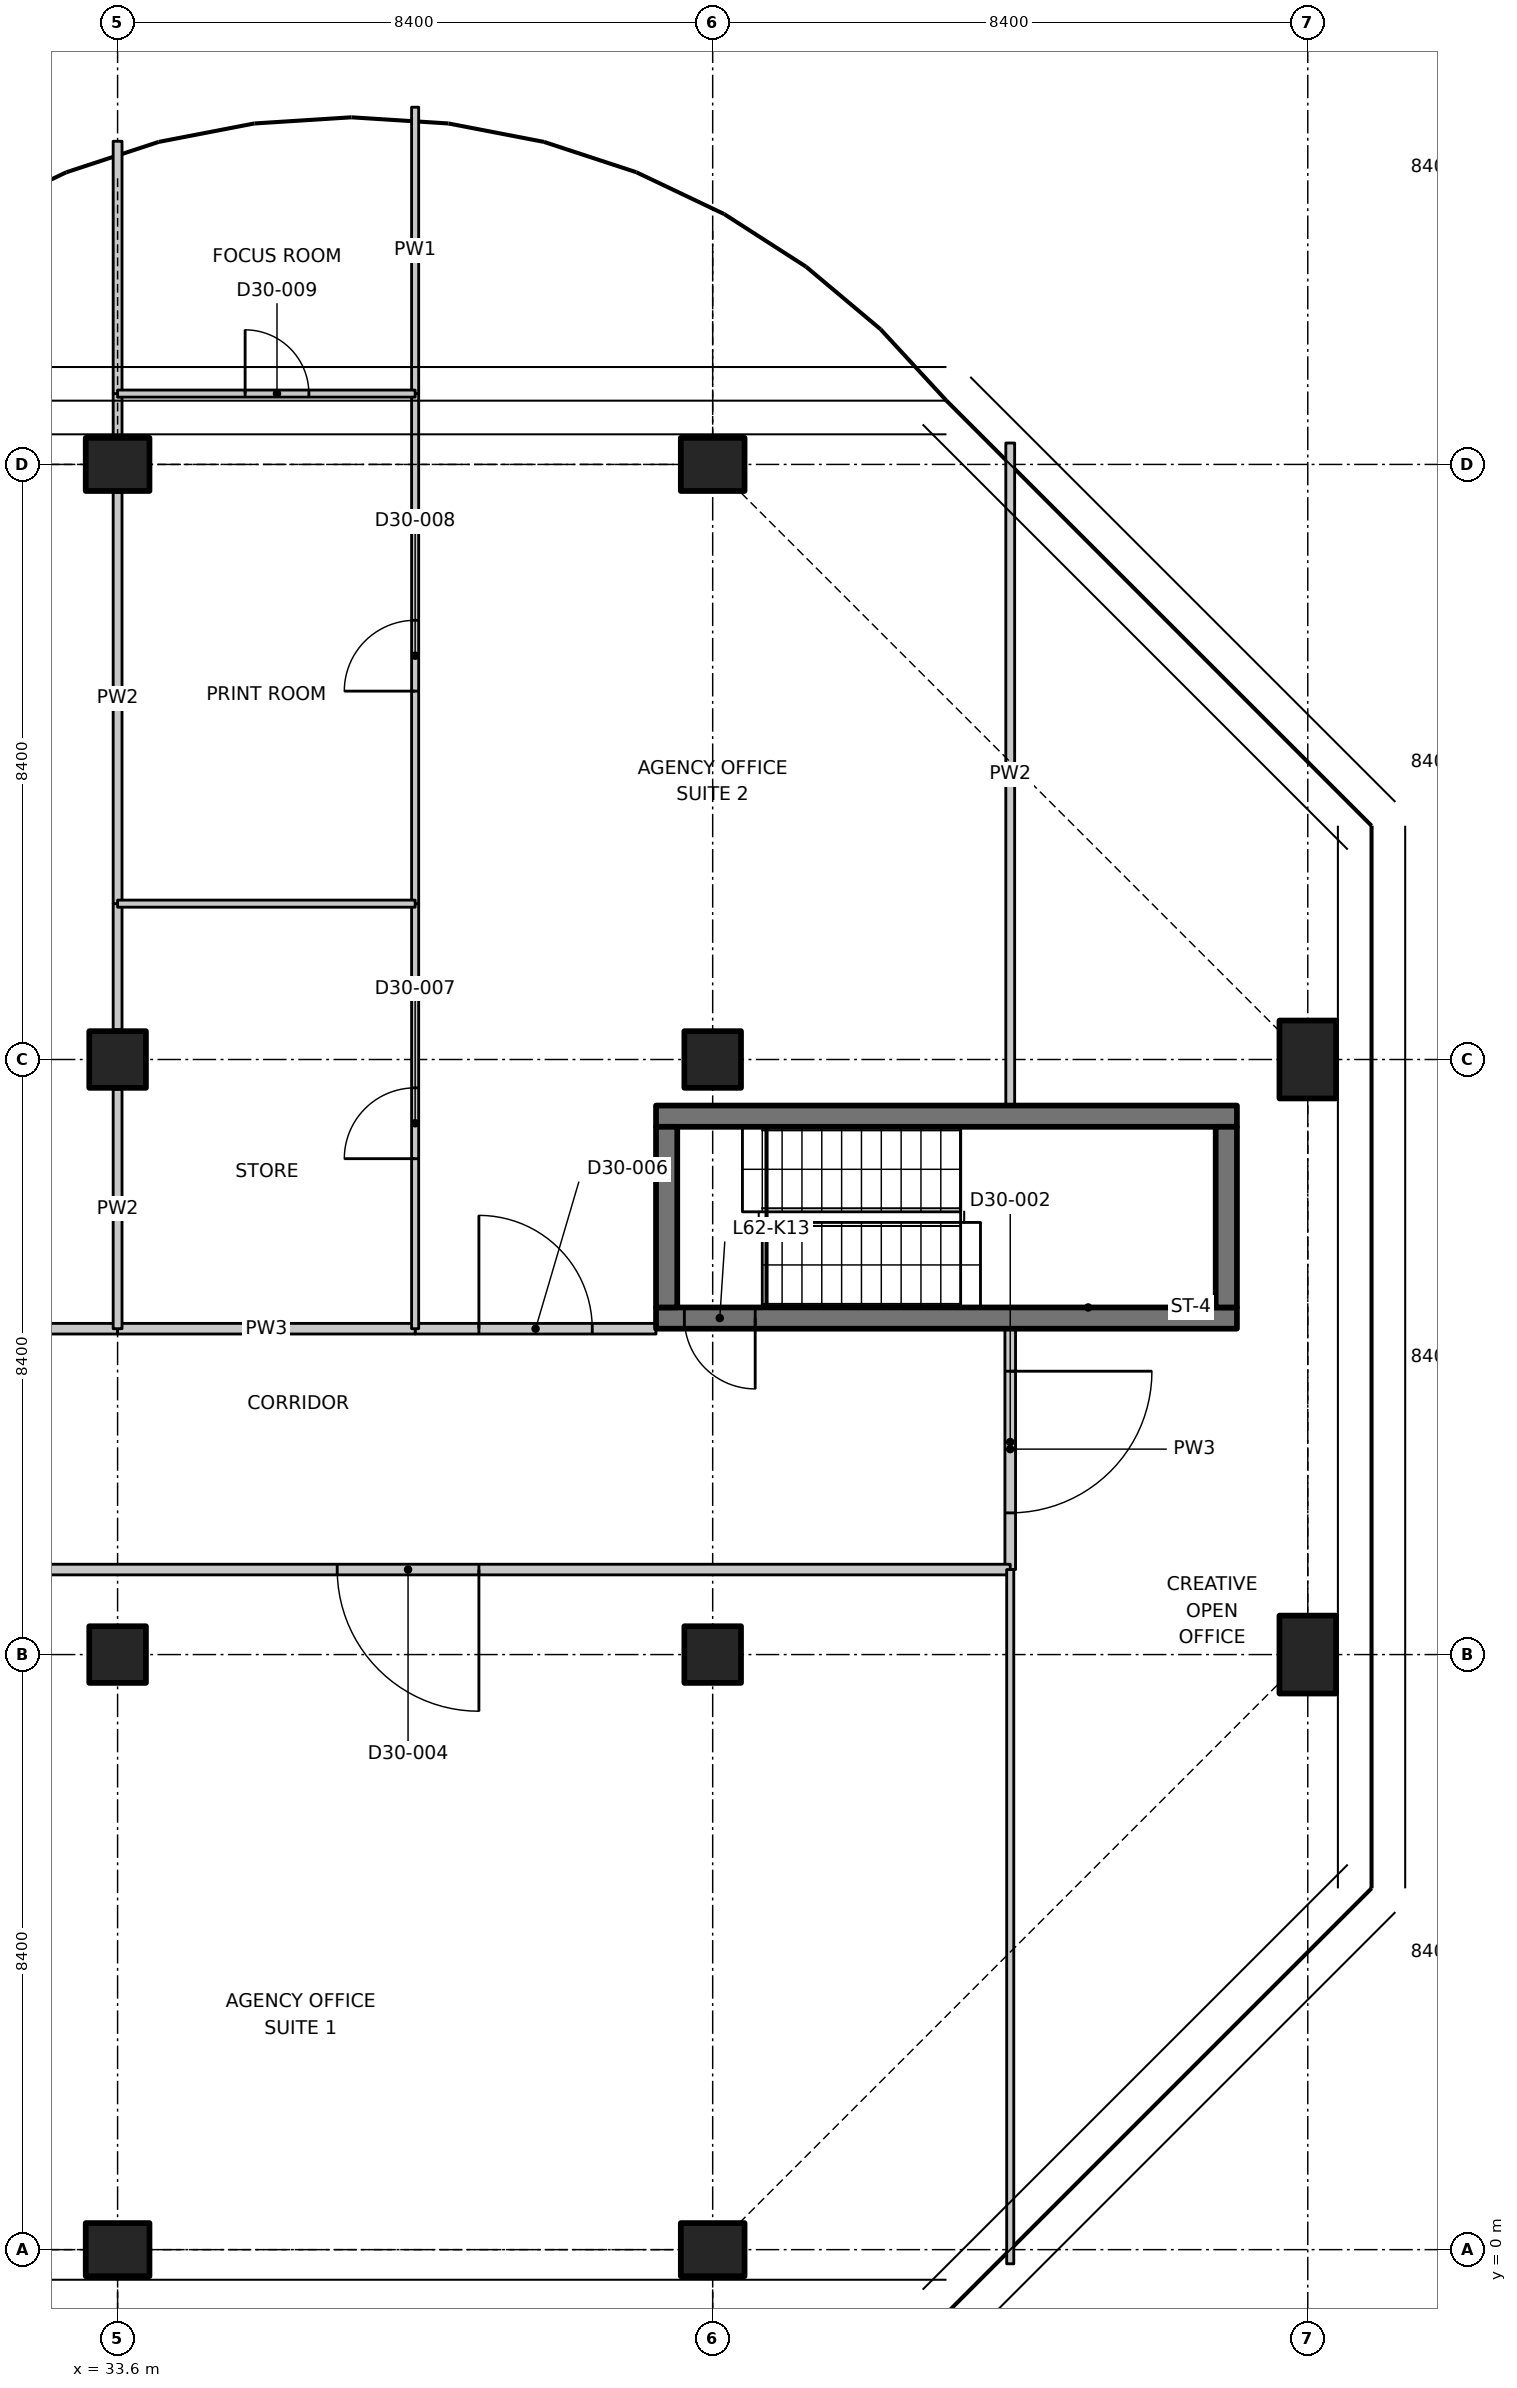
"""IFC4 building model, lengths in metres.
Left out: names, types, materials, properties, quantities, classifications, styles, units other than length and angle.
Written with IfcOpenShell. Run it as: python <this file> out.ifc"""

import sys

from ifc_helpers import new_model, si_unit, direction, frame, frame_2d, origin, origin_2d, place, context, subcontext, project, spatial, polyline, rectangle, outline, extrude, element, fill, save


model = new_model("IFC4")
c1 = context("Model", 3, precision=1e-05, world=origin(), true_north=direction((0.0, 1.0)))
c2 = subcontext(c1, "Body", "Model", "MODEL_VIEW")
j1 = project(units=[si_unit("LENGTHUNIT", "METRE"), si_unit("PLANEANGLEUNIT", "RADIAN")], contexts=[c1])
p1 = place(None, origin())
s1 = spatial("IfcSite", under=j1, at=p1, CompositionType="ELEMENT")
p2 = place(p1, origin())
s2 = spatial("IfcBuilding", under=s1, at=p2, CompositionType="ELEMENT")
p3 = place(p2, frame((0.0, 0.0, 244.5)))
s3 = spatial("IfcBuildingStorey", under=s2, at=p3, CompositionType="ELEMENT", Elevation=244.5)
p4 = place(p3, frame((33.6, 0.0, 0.0), z_axis=(0.0, 0.0, 1.0), x_axis=(0.0, 1.0, 0.0)))
e1 = element("IfcColumn", 1, at=p4, inside=s3, PredefinedType="COLUMN", context=c2, shape_type="SweptSolid", body=[
    extrude(rectangle(XDim=0.75, YDim=0.9, at=origin_2d()), origin(), (0.0, 0.0, 1.0), 3.35),
])
for number, where, z_axis, x_axis in (
    (2, (33.6, 8.4, 0.0), (0.0, 0.0, 1.0), (1.0, 0.0, 0.0)),
    (3, (33.6, 16.8, 0.0), (0.0, 0.0, 1.0), (1.0, 0.0, 0.0)),
):
    element("IfcColumn", number, at=place(p3, frame(where, z_axis=z_axis, x_axis=x_axis)), inside=s3, PredefinedType="COLUMN", context=c2, shape_type="SweptSolid", body=[
        extrude(rectangle(XDim=0.8, YDim=0.8, at=origin_2d()), origin(), (0.0, 0.0, 1.0), 3.35),
    ])
for number, where, z_axis, x_axis in (
    (4, (33.6, 25.2, 0.0), (0.0, 0.0, 1.0), (0.0, 1.0, 0.0)),
    (5, (42.0, 0.0, 0.0), (0.0, 0.0, 1.0), (0.0, 1.0, 0.0)),
):
    element("IfcColumn", number, at=place(p3, frame(where, z_axis=z_axis, x_axis=x_axis)), inside=s3, PredefinedType="COLUMN", context=c2, shape_type="SweptSolid", body=[
        extrude(rectangle(XDim=0.75, YDim=0.9, at=origin_2d()), origin(), (0.0, 0.0, 1.0), 3.35),
    ])
for number, where, z_axis, x_axis in (
    (6, (42.0, 8.4, 0.0), (0.0, 0.0, 1.0), (1.0, 0.0, 0.0)),
    (7, (42.0, 16.8, 0.0), (0.0, 0.0, 1.0), (1.0, 0.0, 0.0)),
):
    element("IfcColumn", number, at=place(p3, frame(where, z_axis=z_axis, x_axis=x_axis)), inside=s3, PredefinedType="COLUMN", context=c2, shape_type="SweptSolid", body=[
        extrude(rectangle(XDim=0.8, YDim=0.8, at=origin_2d()), origin(), (0.0, 0.0, 1.0), 3.35),
    ])
p5 = place(p3, frame((42.0, 25.2, 0.0), z_axis=(0.0, 0.0, 1.0), x_axis=(0.0, 1.0, 0.0)))
e8 = element("IfcColumn", 8, at=p5, inside=s3, PredefinedType="COLUMN", context=c2, shape_type="SweptSolid", body=[
    extrude(rectangle(XDim=0.75, YDim=0.9, at=origin_2d()), origin(), (0.0, 0.0, 1.0), 3.35),
])
for number, where, z_axis, x_axis in (
    (9, (50.4, 8.4, 0.0), (0.0, 0.0, 1.0), (1.0, 0.0, 0.0)),
    (10, (50.4, 16.8, 0.0), (0.0, 0.0, 1.0), (1.0, 0.0, 0.0)),
):
    element("IfcColumn", number, at=place(p3, frame(where, z_axis=z_axis, x_axis=x_axis)), inside=s3, PredefinedType="COLUMN", context=c2, shape_type="SweptSolid", body=[
        extrude(rectangle(XDim=0.8, YDim=1.1, at=origin_2d()), origin(), (0.0, 0.0, 1.0), 3.35),
    ])
p6 = place(p3, frame((49.4, 13.15, 0.0), z_axis=(0.0, 0.0, 1.0), x_axis=(-1.0, 0.0, 0.0)))
e11 = element("IfcWall", 11, at=p6, inside=s3, PredefinedType="SHEAR", context=c2, shape_type="SweptSolid", body=[
    extrude(rectangle(XDim=8.2, YDim=0.3, at=frame_2d((4.1, 0.0))), origin(), (0.0, 0.0, 1.0), 3.35),
])
p7 = place(p6, frame((6.8, 0.0, 0.0)))
e12 = element("IfcOpeningElement", 12, at=p7, cuts=e11, PredefinedType="OPENING", context=c2, shape_type="SweptSolid", body=[
    extrude(rectangle(XDim=1.0, YDim=2.1, at=frame_2d((0.5, 1.05))), frame((0.0, 0.16, 0.0), z_axis=(0.0, -1.0, 0.0), x_axis=(1.0, 0.0, 0.0)), (0.0, 0.0, 1.0), 0.32),
])
p8 = place(p3, frame((41.2, 16.0, 0.0), z_axis=(0.0, 0.0, 1.0), x_axis=(1.0, 0.0, 0.0)))
e13 = element("IfcWall", 13, at=p8, inside=s3, PredefinedType="SHEAR", context=c2, shape_type="SweptSolid", body=[
    extrude(rectangle(XDim=8.2, YDim=0.3, at=frame_2d((4.1, 0.0))), origin(), (0.0, 0.0, 1.0), 3.35),
])
for number, where, z_axis, x_axis in (
    (14, (41.35, 13.3, 0.0), (0.0, 0.0, 1.0), (0.0, 1.0, 0.0)),
    (15, (49.25, 13.3, 0.0), (0.0, 0.0, 1.0), (0.0, 1.0, 0.0)),
):
    element("IfcWall", number, at=place(p3, frame(where, z_axis=z_axis, x_axis=x_axis)), inside=s3, PredefinedType="SHEAR", context=c2, shape_type="SweptSolid", body=[
        extrude(rectangle(XDim=2.55, YDim=0.3, at=frame_2d((1.275, 0.0))), origin(), (0.0, 0.0, 1.0), 3.35),
    ])
p9 = place(p3, frame((46.2, 13.0, 0.0), z_axis=(0.0, 0.0, 1.0), x_axis=(0.0, -1.0, 0.0)))
e16 = element("IfcWall", 16, at=p9, inside=s3, PredefinedType="PARTITIONING", context=c2, shape_type="SweptSolid", body=[
    extrude(rectangle(XDim=3.4, YDim=0.15, at=frame_2d((1.7, 0.0))), origin(), (0.0, 0.0, 1.0), 3.33),
])
p10 = place(p9, frame((0.6, 0.0, 0.0)))
e17 = element("IfcOpeningElement", 17, at=p10, cuts=e16, PredefinedType="OPENING", context=c2, shape_type="SweptSolid", body=[
    extrude(rectangle(XDim=2.0, YDim=2.4, at=frame_2d((1.0, 1.2))), frame((0.0, 0.085, 0.0), z_axis=(0.0, -1.0, 0.0), x_axis=(1.0, 0.0, 0.0)), (0.0, 0.0, 1.0), 0.17),
])
p11 = place(p3, frame((46.2, 9.6, 0.0), z_axis=(0.0, 0.0, 1.0), x_axis=(-1.0, 0.0, 0.0)))
e18 = element("IfcWall", 18, at=p11, inside=s3, PredefinedType="PARTITIONING", context=c2, shape_type="SweptSolid", body=[
    extrude(rectangle(XDim=16.8, YDim=0.15, at=frame_2d((8.4, 0.0))), origin(), (0.0, 0.0, 1.0), 3.33),
])
p12 = place(p11, frame((7.5, 0.0, 0.0)))
e19 = element("IfcOpeningElement", 19, at=p12, cuts=e18, PredefinedType="OPENING", context=c2, shape_type="SweptSolid", body=[
    extrude(rectangle(XDim=2.0, YDim=2.4, at=frame_2d((1.0, 1.2))), frame((0.0, 0.085, 0.0), z_axis=(0.0, -1.0, 0.0), x_axis=(1.0, 0.0, 0.0)), (0.0, 0.0, 1.0), 0.17),
])
p13 = place(p3, frame((29.4, 13.0, 0.0), z_axis=(0.0, 0.0, 1.0), x_axis=(1.0, 0.0, 0.0)))
e20 = element("IfcWall", 20, at=p13, inside=s3, PredefinedType="PARTITIONING", context=c2, shape_type="SweptSolid", body=[
    extrude(rectangle(XDim=4.2, YDim=0.15, at=frame_2d((2.1, 0.0))), origin(), (0.0, 0.0, 1.0), 3.33),
])
p14 = place(p3, frame((37.8, 13.0, 0.0), z_axis=(0.0, 0.0, 1.0), x_axis=(1.0, 0.0, 0.0)))
e21 = element("IfcWall", 21, at=p14, inside=s3, PredefinedType="PARTITIONING", context=c2, shape_type="SweptSolid", body=[
    extrude(rectangle(XDim=3.4, YDim=0.15, at=frame_2d((1.7, 0.0))), origin(), (0.0, 0.0, 1.0), 3.33),
])
p15 = place(p14, frame((0.9, 0.0, 0.0)))
e22 = element("IfcOpeningElement", 22, at=p15, cuts=e21, PredefinedType="OPENING", context=c2, shape_type="SweptSolid", body=[
    extrude(rectangle(XDim=1.6, YDim=2.1, at=frame_2d((0.8, 1.05))), frame((0.0, 0.085, 0.0), z_axis=(0.0, -1.0, 0.0), x_axis=(1.0, 0.0, 0.0)), (0.0, 0.0, 1.0), 0.17),
])
p16 = place(p3, frame((33.6, 13.0, 0.0), z_axis=(0.0, 0.0, 1.0), x_axis=(1.0, 0.0, 0.0)))
e23 = element("IfcWall", 23, at=p16, inside=s3, PredefinedType="PARTITIONING", context=c2, shape_type="SweptSolid", body=[
    extrude(rectangle(XDim=4.2, YDim=0.15, at=frame_2d((2.1, 0.0))), origin(), (0.0, 0.0, 1.0), 3.33),
])
p17 = place(p3, frame((46.2, -0.2, 0.0), z_axis=(0.0, 0.0, 1.0), x_axis=(0.0, 1.0, 0.0)))
e24 = element("IfcWall", 24, at=p17, inside=s3, PredefinedType="PARTITIONING", context=c2, shape_type="SweptSolid", body=[
    extrude(outline(polyline([(0.0, 0.0), (9.8, 0.0), (9.8, 3.33), (5.066, 3.33), (5.064, 2.98), (3.736, 2.98), (3.734, 3.33), (0.0, 3.33), (0.0, 0.0)])), frame((0.0, 0.05, 0.0), z_axis=(0.0, -1.0, 0.0), x_axis=(1.0, 0.0, 0.0)), (0.0, 0.0, 1.0), 0.1),
])
p18 = place(p3, frame((46.2, 16.15, 0.0), z_axis=(0.0, 0.0, 1.0), x_axis=(0.0, 1.0, 0.0)))
e25 = element("IfcWall", 25, at=p18, inside=s3, PredefinedType="PARTITIONING", context=c2, shape_type="SweptSolid", body=[
    extrude(outline(polyline([(0.0, 0.0), (9.353, 0.0), (9.353, 3.33), (9.25, 3.33), (5.528, 3.33), (5.526, 2.98), (4.174, 2.98), (4.172, 3.33), (0.0, 3.33), (0.0, 0.0)])), frame((0.0, 0.062, 0.0), z_axis=(0.0, -1.0, 0.0), x_axis=(1.0, 0.0, 0.0)), (0.0, 0.0, 1.0), 0.125),
])
p19 = place(p3, frame((33.6, 19.0, 0.0), z_axis=(0.0, 0.0, 1.0), x_axis=(0.0, -1.0, 0.0)))
e26 = element("IfcWall", 26, at=p19, inside=s3, PredefinedType="PARTITIONING", context=c2, shape_type="SweptSolid", body=[
    extrude(rectangle(XDim=1.78, YDim=0.125, at=frame_2d((0.89, 0.0))), origin(), (0.0, 0.0, 1.0), 3.33),
])
p20 = place(p3, frame((33.6, 16.38, 0.0), z_axis=(0.0, 0.0, 1.0), x_axis=(0.0, -1.0, 0.0)))
e27 = element("IfcWall", 27, at=p20, inside=s3, PredefinedType="PARTITIONING", context=c2, shape_type="SweptSolid", body=[
    extrude(rectangle(XDim=3.38, YDim=0.125, at=frame_2d((1.69, 0.0))), origin(), (0.0, 0.0, 1.0), 3.33),
])
p21 = place(p3, frame((33.6, 26.2, 0.0), z_axis=(0.0, 0.0, 1.0), x_axis=(0.0, -1.0, 0.0)))
e28 = element("IfcWall", 28, at=p21, inside=s3, PredefinedType="PARTITIONING", context=c2, shape_type="SweptSolid", body=[
    extrude(rectangle(XDim=0.605, YDim=0.125, at=frame_2d((0.302, 0.0))), origin(), (0.0, 0.0, 1.0), 2.98),
])
p22 = place(p3, frame((33.6, 24.805, 0.0), z_axis=(0.0, 0.0, 1.0), x_axis=(0.0, -1.0, 0.0)))
e29 = element("IfcWall", 29, at=p22, inside=s3, PredefinedType="PARTITIONING", context=c2, shape_type="SweptSolid", body=[
    extrude(outline(polyline([(0.0, 0.0), (5.805, 0.0), (5.805, 3.33), (0.055, 3.33), (0.053, 2.98), (0.0, 2.98), (0.0, 0.0)])), frame((0.0, 0.062, 0.0), z_axis=(0.0, -1.0, 0.0), x_axis=(1.0, 0.0, 0.0)), (0.0, 0.0, 1.0), 0.125),
])
p23 = place(p3, frame((33.6, 29.762, 0.0), z_axis=(0.0, 0.0, 1.0), x_axis=(0.0, -1.0, 0.0)))
e30 = element("IfcWall", 30, at=p23, inside=s3, PredefinedType="PARTITIONING", context=c2, shape_type="SweptSolid", body=[
    extrude(rectangle(XDim=3.562, YDim=0.125, at=frame_2d((1.781, 0.0))), origin(), (0.0, 0.0, 1.0), 2.98),
])
p24 = place(p3, frame((37.8, 13.0, 0.0), z_axis=(0.0, 0.0, 1.0), x_axis=(0.0, 1.0, 0.0)))
e31 = element("IfcWall", 31, at=p24, inside=s3, PredefinedType="PARTITIONING", context=c2, shape_type="SweptSolid", body=[
    extrude(rectangle(XDim=6.0, YDim=0.1, at=frame_2d((3.0, 0.0))), origin(), (0.0, 0.0, 1.0), 3.33),
])
p25 = place(p24, frame((2.4, 0.0, 0.0)))
e32 = element("IfcOpeningElement", 32, at=p25, cuts=e31, PredefinedType="OPENING", context=c2, shape_type="SweptSolid", body=[
    extrude(rectangle(XDim=1.0, YDim=2.1, at=frame_2d((0.5, 1.05))), frame((0.0, 0.06, 0.0), z_axis=(0.0, -1.0, 0.0), x_axis=(1.0, 0.0, 0.0)), (0.0, 0.0, 1.0), 0.12),
])
p26 = place(p3, frame((37.8, 19.0, 0.0), z_axis=(0.0, 0.0, 1.0), x_axis=(0.0, 1.0, 0.0)))
e33 = element("IfcWall", 33, at=p26, inside=s3, PredefinedType="PARTITIONING", context=c2, shape_type="SweptSolid", body=[
    extrude(outline(polyline([(0.0, 0.0), (7.2, 0.0), (7.2, 3.33), (6.65, 3.33), (6.648, 2.98), (5.752, 2.98), (5.75, 3.33), (0.0, 3.33), (0.0, 0.0)])), frame((0.0, 0.05, 0.0), z_axis=(0.0, -1.0, 0.0), x_axis=(1.0, 0.0, 0.0)), (0.0, 0.0, 1.0), 0.1),
])
p27 = place(p26, frame((3.0, 0.0, 0.0)))
e34 = element("IfcOpeningElement", 34, at=p27, cuts=e33, PredefinedType="OPENING", context=c2, shape_type="SweptSolid", body=[
    extrude(rectangle(XDim=1.0, YDim=2.1, at=frame_2d((0.5, 1.05))), frame((0.0, 0.06, 0.0), z_axis=(0.0, -1.0, 0.0), x_axis=(1.0, 0.0, 0.0)), (0.0, 0.0, 1.0), 0.12),
])
p28 = place(p3, frame((37.8, 26.2, 0.0), z_axis=(0.0, 0.0, 1.0), x_axis=(0.0, 1.0, 0.0)))
e35 = element("IfcWall", 35, at=p28, inside=s3, PredefinedType="PARTITIONING", context=c2, shape_type="SweptSolid", body=[
    extrude(rectangle(XDim=4.043, YDim=0.1, at=frame_2d((2.021, 0.0))), origin(), (0.0, 0.0, 1.0), 3.33),
])
p29 = place(p3, frame((33.6, 19.0, 0.0), z_axis=(0.0, 0.0, 1.0), x_axis=(1.0, 0.0, 0.0)))
e36 = element("IfcWall", 36, at=p29, inside=s3, PredefinedType="PARTITIONING", context=c2, shape_type="SweptSolid", body=[
    extrude(rectangle(XDim=4.2, YDim=0.1, at=frame_2d((2.1, 0.0))), origin(), (0.0, 0.0, 1.0), 3.33),
])
p30 = place(p3, frame((33.6, 26.2, 0.0), z_axis=(0.0, 0.0, 1.0), x_axis=(1.0, 0.0, 0.0)))
e37 = element("IfcWall", 37, at=p30, inside=s3, PredefinedType="PARTITIONING", context=c2, shape_type="SweptSolid", body=[
    extrude(rectangle(XDim=4.2, YDim=0.1, at=frame_2d((2.1, 0.0))), origin(), (0.0, 0.0, 1.0), 2.98),
])
p31 = place(p30, frame((1.8, 0.0, 0.0)))
e38 = element("IfcOpeningElement", 38, at=p31, cuts=e37, PredefinedType="OPENING", context=c2, shape_type="SweptSolid", body=[
    extrude(rectangle(XDim=0.9, YDim=2.1, at=frame_2d((0.45, 1.05))), frame((0.0, 0.06, 0.0), z_axis=(0.0, -1.0, 0.0), x_axis=(1.0, 0.0, 0.0)), (0.0, 0.0, 1.0), 0.12),
])
p32 = place(p7, origin())
e39 = element("IfcDoor", 39, at=p32, inside=s3, OperationType="SINGLE_SWING_LEFT", PredefinedType="DOOR", context=c2, shape_type="SweptSolid", body=[
    extrude(rectangle(XDim=1.0, YDim=2.1, at=frame_2d((0.5, 1.05))), frame((0.0, 0.025, 0.0), z_axis=(0.0, -1.0, 0.0), x_axis=(1.0, 0.0, 0.0)), (0.0, 0.0, 1.0), 0.05),
])
fill(e12, e39)
p33 = place(p10, origin())
e40 = element("IfcDoor", 40, at=p33, inside=s3, OperationType="DOUBLE_DOOR_SINGLE_SWING", PredefinedType="DOOR", context=c2, shape_type="SweptSolid", body=[
    extrude(rectangle(XDim=2.0, YDim=2.4, at=frame_2d((1.0, 1.2))), frame((0.0, 0.025, 0.0), z_axis=(0.0, -1.0, 0.0), x_axis=(1.0, 0.0, 0.0)), (0.0, 0.0, 1.0), 0.05),
])
fill(e17, e40)
p34 = place(p12, origin())
e41 = element("IfcDoor", 41, at=p34, inside=s3, OperationType="DOUBLE_DOOR_SINGLE_SWING", PredefinedType="DOOR", context=c2, shape_type="SweptSolid", body=[
    extrude(rectangle(XDim=2.0, YDim=2.4, at=frame_2d((1.0, 1.2))), frame((0.0, 0.025, 0.0), z_axis=(0.0, -1.0, 0.0), x_axis=(1.0, 0.0, 0.0)), (0.0, 0.0, 1.0), 0.05),
])
fill(e19, e41)
p35 = place(p15, origin())
e42 = element("IfcDoor", 42, at=p35, inside=s3, OperationType="DOUBLE_DOOR_SINGLE_SWING", PredefinedType="DOOR", context=c2, shape_type="SweptSolid", body=[
    extrude(rectangle(XDim=1.6, YDim=2.1, at=frame_2d((0.8, 1.05))), frame((0.0, 0.025, 0.0), z_axis=(0.0, -1.0, 0.0), x_axis=(1.0, 0.0, 0.0)), (0.0, 0.0, 1.0), 0.05),
])
fill(e22, e42)
p36 = place(p25, origin())
e43 = element("IfcDoor", 43, at=p36, inside=s3, OperationType="SINGLE_SWING_LEFT", PredefinedType="DOOR", context=c2, shape_type="SweptSolid", body=[
    extrude(rectangle(XDim=1.0, YDim=2.1, at=frame_2d((0.5, 1.05))), frame((0.0, 0.025, 0.0), z_axis=(0.0, -1.0, 0.0), x_axis=(1.0, 0.0, 0.0)), (0.0, 0.0, 1.0), 0.05),
])
fill(e32, e43)
p37 = place(p27, origin())
e44 = element("IfcDoor", 44, at=p37, inside=s3, OperationType="SINGLE_SWING_LEFT", PredefinedType="DOOR", context=c2, shape_type="SweptSolid", body=[
    extrude(rectangle(XDim=1.0, YDim=2.1, at=frame_2d((0.5, 1.05))), frame((0.0, 0.025, 0.0), z_axis=(0.0, -1.0, 0.0), x_axis=(1.0, 0.0, 0.0)), (0.0, 0.0, 1.0), 0.05),
])
fill(e34, e44)
p38 = place(p31, origin())
e45 = element("IfcDoor", 45, at=p38, inside=s3, OperationType="SINGLE_SWING_LEFT", PredefinedType="DOOR", context=c2, shape_type="SweptSolid", body=[
    extrude(rectangle(XDim=0.9, YDim=2.1, at=frame_2d((0.45, 1.05))), frame((0.0, 0.025, 0.0), z_axis=(0.0, -1.0, 0.0), x_axis=(1.0, 0.0, 0.0)), (0.0, 0.0, 1.0), 0.05),
])
fill(e38, e45)
save(model, sys.argv[1])
